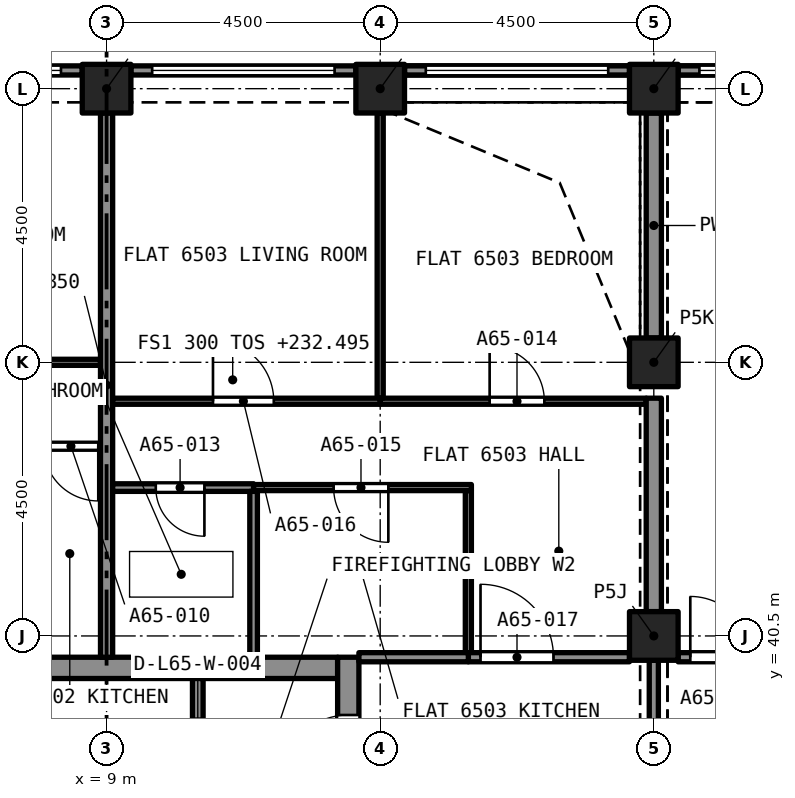
"""IFC4 building model, lengths in metres.
Left out: names, types, materials, properties, quantities, classifications, styles, units other than length and angle.
Written with IfcOpenShell. Run it as: python <this file> out.ifc"""

import sys

from ifc_helpers import new_model, si_unit, direction, frame, frame_2d, origin, origin_2d, place, context, subcontext, project, spatial, rectangle, extrude, element, fill, save


model = new_model("IFC4")
c1 = context("Model", 3, precision=1e-05, world=origin(), true_north=direction((0.0, 1.0)))
c2 = subcontext(c1, "Body", "Model", "MODEL_VIEW")
j1 = project(units=[si_unit("LENGTHUNIT", "METRE"), si_unit("PLANEANGLEUNIT", "RADIAN")], contexts=[c1])
p1 = place(None, origin())
s1 = spatial("IfcSite", under=j1, at=p1, CompositionType="ELEMENT")
p2 = place(p1, origin())
s2 = spatial("IfcBuilding", under=s1, at=p2, CompositionType="ELEMENT")
p3 = place(p2, frame((0.0, 0.0, 232.495)))
s3 = spatial("IfcBuildingStorey", under=s2, at=p3, CompositionType="ELEMENT", Elevation=232.495)
for number, where, z_axis, x_axis in (
    (1, (18.0, 40.5, 0.0), (0.0, 0.0, 1.0), (1.0, 0.0, 0.0)),
    (2, (18.0, 45.0, 0.0), (0.0, 0.0, 1.0), (1.0, 0.0, 0.0)),
    (3, (9.0, 49.5, 0.0), (0.0, 0.0, 1.0), (1.0, 0.0, 0.0)),
    (4, (13.5, 49.5, 0.0), (0.0, 0.0, 1.0), (1.0, 0.0, 0.0)),
    (5, (18.0, 49.5, 0.0), (0.0, 0.0, 1.0), (1.0, 0.0, 0.0)),
):
    element("IfcColumn", number, at=place(p3, frame(where, z_axis=z_axis, x_axis=x_axis)), inside=s3, PredefinedType="COLUMN", context=c2, shape_type="SweptSolid", body=[
        extrude(rectangle(XDim=0.8, YDim=0.8, at=origin_2d()), origin(), (0.0, 0.0, 1.0), 3.2),
    ])
p4 = place(p3, frame((5.2, 39.975, 0.0), z_axis=(0.0, 0.0, 1.0), x_axis=(1.0, 0.0, 0.0)))
e6 = element("IfcWall", 6, at=p4, inside=s3, PredefinedType="SOLIDWALL", context=c2, shape_type="SweptSolid", body=[
    extrude(rectangle(XDim=7.6, YDim=0.35, at=frame_2d((3.8, 0.0))), origin(), (0.0, 0.0, 1.0), 3.2),
])
p5 = place(p3, frame((12.975, 27.35, 0.0), z_axis=(0.0, 0.0, 1.0), x_axis=(0.0, 1.0, 0.0)))
e7 = element("IfcWall", 7, at=p5, inside=s3, PredefinedType="SOLIDWALL", context=c2, shape_type="SweptSolid", body=[
    extrude(rectangle(XDim=12.8, YDim=0.35, at=frame_2d((6.4, 0.0))), origin(), (0.0, 0.0, 1.0), 3.2),
])
p6 = place(p5, frame((10.75, 0.0, 0.0)))
e8 = element("IfcOpeningElement", 8, at=p6, cuts=e7, PredefinedType="OPENING", context=c2, shape_type="SweptSolid", body=[
    extrude(rectangle(XDim=1.1, YDim=2.1, at=frame_2d((0.55, 1.05))), frame((0.0, 0.185, 0.0), z_axis=(0.0, -1.0, 0.0), x_axis=(1.0, 0.0, 0.0)), (0.0, 0.0, 1.0), 0.37),
])
p7 = place(p5, frame((8.6, 0.0, 0.0)))
e9 = element("IfcOpeningElement", 9, at=p7, cuts=e7, PredefinedType="OPENING", context=c2, shape_type="SweptSolid", body=[
    extrude(rectangle(XDim=1.2, YDim=2.1, at=frame_2d((0.6, 1.05))), frame((0.0, 0.185, 0.0), z_axis=(0.0, -1.0, 0.0), x_axis=(1.0, 0.0, 0.0)), (0.0, 0.0, 1.0), 0.37),
])
p8 = place(p3, frame((18.4, 49.8, 0.0), z_axis=(0.0, 0.0, 1.0), x_axis=(1.0, 0.0, 0.0)))
e10 = element("IfcWall", 10, at=p8, inside=s3, PredefinedType="SOLIDWALL", context=c2, shape_type="SweptSolid", body=[
    extrude(rectangle(XDim=3.7, YDim=0.15, at=frame_2d((1.85, 0.0))), origin(), (0.0, 0.0, 1.0), 3.2),
])
p9 = place(p8, frame((0.35, 0.0, 0.45)))
e11 = element("IfcOpeningElement", 11, at=p9, cuts=e10, PredefinedType="OPENING", context=c2, shape_type="SweptSolid", body=[
    extrude(rectangle(XDim=3.0, YDim=1.95, at=frame_2d((1.5, 0.975))), frame((0.0, 0.085, 0.0), z_axis=(0.0, -1.0, 0.0), x_axis=(1.0, 0.0, 0.0)), (0.0, 0.0, 1.0), 0.17),
])
p10 = place(p3, frame((13.9, 49.8, 0.0), z_axis=(0.0, 0.0, 1.0), x_axis=(1.0, 0.0, 0.0)))
e12 = element("IfcWall", 12, at=p10, inside=s3, PredefinedType="SOLIDWALL", context=c2, shape_type="SweptSolid", body=[
    extrude(rectangle(XDim=3.7, YDim=0.15, at=frame_2d((1.85, 0.0))), origin(), (0.0, 0.0, 1.0), 3.2),
])
p11 = place(p10, frame((0.35, 0.0, 0.45)))
e13 = element("IfcOpeningElement", 13, at=p11, cuts=e12, PredefinedType="OPENING", context=c2, shape_type="SweptSolid", body=[
    extrude(rectangle(XDim=3.0, YDim=1.95, at=frame_2d((1.5, 0.975))), frame((0.0, 0.085, 0.0), z_axis=(0.0, -1.0, 0.0), x_axis=(1.0, 0.0, 0.0)), (0.0, 0.0, 1.0), 0.17),
])
p12 = place(p3, frame((9.4, 49.8, 0.0), z_axis=(0.0, 0.0, 1.0), x_axis=(1.0, 0.0, 0.0)))
e14 = element("IfcWall", 14, at=p12, inside=s3, PredefinedType="SOLIDWALL", context=c2, shape_type="SweptSolid", body=[
    extrude(rectangle(XDim=3.7, YDim=0.15, at=frame_2d((1.85, 0.0))), origin(), (0.0, 0.0, 1.0), 3.2),
])
p13 = place(p12, frame((0.35, 0.0, 0.45)))
e15 = element("IfcOpeningElement", 15, at=p13, cuts=e14, PredefinedType="OPENING", context=c2, shape_type="SweptSolid", body=[
    extrude(rectangle(XDim=3.0, YDim=1.95, at=frame_2d((1.5, 0.975))), frame((0.0, 0.085, 0.0), z_axis=(0.0, -1.0, 0.0), x_axis=(1.0, 0.0, 0.0)), (0.0, 0.0, 1.0), 0.17),
])
p14 = place(p3, frame((4.9, 49.8, 0.0), z_axis=(0.0, 0.0, 1.0), x_axis=(1.0, 0.0, 0.0)))
e16 = element("IfcWall", 16, at=p14, inside=s3, PredefinedType="SOLIDWALL", context=c2, shape_type="SweptSolid", body=[
    extrude(rectangle(XDim=3.7, YDim=0.15, at=frame_2d((1.85, 0.0))), origin(), (0.0, 0.0, 1.0), 3.2),
])
p15 = place(p14, frame((0.35, 0.0, 0.45)))
e17 = element("IfcOpeningElement", 17, at=p15, cuts=e16, PredefinedType="OPENING", context=c2, shape_type="SweptSolid", body=[
    extrude(rectangle(XDim=3.0, YDim=1.95, at=frame_2d((1.5, 0.975))), frame((0.0, 0.085, 0.0), z_axis=(0.0, -1.0, 0.0), x_axis=(1.0, 0.0, 0.0)), (0.0, 0.0, 1.0), 0.17),
])
for number, where, z_axis, x_axis in (
    (18, (18.4, 49.8, 3.2), (0.0, 0.0, 1.0), (1.0, 0.0, 0.0)),
    (19, (13.9, 49.8, 3.2), (0.0, 0.0, 1.0), (1.0, 0.0, 0.0)),
):
    element("IfcWall", number, at=place(p3, frame(where, z_axis=z_axis, x_axis=x_axis)), inside=s3, PredefinedType="PARAPET", context=c2, shape_type="SweptSolid", body=[
        extrude(rectangle(XDim=3.7, YDim=0.15, at=frame_2d((1.85, 0.0))), origin(), (0.0, 0.0, 1.0), 1.1),
    ])
p16 = place(p3, frame((4.5, 45.0, 0.0), z_axis=(0.0, 0.0, 1.0), x_axis=(1.0, 0.0, 0.0)))
e20 = element("IfcWall", 20, at=p16, inside=s3, PredefinedType="PARTITIONING", context=c2, shape_type="SweptSolid", body=[
    extrude(rectangle(XDim=4.4, YDim=0.1, at=frame_2d((2.2, 0.0))), origin(), (0.0, 0.0, 1.0), 2.85),
])
p17 = place(p16, frame((1.8, 0.0, 0.0)))
e21 = element("IfcOpeningElement", 21, at=p17, cuts=e20, PredefinedType="OPENING", context=c2, shape_type="SweptSolid", body=[
    extrude(rectangle(XDim=0.9, YDim=2.1, at=frame_2d((0.45, 1.05))), frame((0.0, 0.06, 0.0), z_axis=(0.0, -1.0, 0.0), x_axis=(1.0, 0.0, 0.0)), (0.0, 0.0, 1.0), 0.12),
])
p18 = place(p3, frame((8.9, 43.62, 0.0), z_axis=(0.0, 0.0, 1.0), x_axis=(-1.0, 0.0, 0.0)))
e22 = element("IfcWall", 22, at=p18, inside=s3, PredefinedType="PARTITIONING", context=c2, shape_type="SweptSolid", body=[
    extrude(rectangle(XDim=1.073, YDim=0.1, at=frame_2d((0.536, 0.0))), origin(), (0.0, 0.0, 1.0), 2.85),
])
p19 = place(p18, frame((0.036, 0.0, 0.0)))
e23 = element("IfcOpeningElement", 23, at=p19, cuts=e22, PredefinedType="OPENING", context=c2, shape_type="SweptSolid", body=[
    extrude(rectangle(XDim=0.9, YDim=2.1, at=frame_2d((0.45, 1.05))), frame((0.0, 0.06, 0.0), z_axis=(0.0, -1.0, 0.0), x_axis=(1.0, 0.0, 0.0)), (0.0, 0.0, 1.0), 0.12),
])
p20 = place(p3, frame((9.0, 40.15, 0.0), z_axis=(0.0, 0.0, 1.0), x_axis=(0.0, 1.0, 0.0)))
e24 = element("IfcWall", 24, at=p20, inside=s3, PredefinedType="PARTITIONING", context=c2, shape_type="SweptSolid", body=[
    extrude(rectangle(XDim=8.95, YDim=0.2, at=frame_2d((4.475, 0.0))), origin(), (0.0, 0.0, 1.0), 2.85),
])
p21 = place(p3, frame((11.418, 42.94, 0.0), z_axis=(0.0, 0.0, 1.0), x_axis=(-1.0, 0.0, 0.0)))
e25 = element("IfcWall", 25, at=p21, inside=s3, PredefinedType="PARTITIONING", context=c2, shape_type="SweptSolid", body=[
    extrude(rectangle(XDim=2.318, YDim=0.125, at=frame_2d((1.159, 0.0))), origin(), (0.0, 0.0, 1.0), 2.85),
])
p22 = place(p21, frame((0.809, 0.0, 0.0)))
e26 = element("IfcOpeningElement", 26, at=p22, cuts=e25, PredefinedType="OPENING", context=c2, shape_type="SweptSolid", body=[
    extrude(rectangle(XDim=0.8, YDim=2.1, at=frame_2d((0.4, 1.05))), frame((0.0, 0.073, 0.0), z_axis=(0.0, -1.0, 0.0), x_axis=(1.0, 0.0, 0.0)), (0.0, 0.0, 1.0), 0.145),
])
p23 = place(p3, frame((11.418, 40.15, 0.0), z_axis=(0.0, 0.0, 1.0), x_axis=(0.0, 1.0, 0.0)))
e27 = element("IfcWall", 27, at=p23, inside=s3, PredefinedType="PARTITIONING", context=c2, shape_type="SweptSolid", body=[
    extrude(rectangle(XDim=2.728, YDim=0.125, at=frame_2d((1.364, 0.0))), origin(), (0.0, 0.0, 1.0), 2.85),
])
p24 = place(p3, frame((13.5, 44.36, 0.0), z_axis=(0.0, 0.0, 1.0), x_axis=(1.0, 0.0, 0.0)))
e28 = element("IfcWall", 28, at=p24, inside=s3, PredefinedType="PARTITIONING", context=c2, shape_type="SweptSolid", body=[
    extrude(rectangle(XDim=4.375, YDim=0.1, at=frame_2d((2.188, 0.0))), origin(), (0.0, 0.0, 1.0), 2.85),
])
p25 = place(p24, frame((1.8, 0.0, 0.0)))
e29 = element("IfcOpeningElement", 29, at=p25, cuts=e28, PredefinedType="OPENING", context=c2, shape_type="SweptSolid", body=[
    extrude(rectangle(XDim=0.9, YDim=2.1, at=frame_2d((0.45, 1.05))), frame((0.0, 0.06, 0.0), z_axis=(0.0, -1.0, 0.0), x_axis=(1.0, 0.0, 0.0)), (0.0, 0.0, 1.0), 0.12),
])
p26 = place(p3, frame((13.5, 44.41, 0.0), z_axis=(0.0, 0.0, 1.0), x_axis=(0.0, 1.0, 0.0)))
e30 = element("IfcWall", 30, at=p26, inside=s3, PredefinedType="PARTITIONING", context=c2, shape_type="SweptSolid", body=[
    extrude(rectangle(XDim=4.69, YDim=0.1, at=frame_2d((2.345, 0.0))), origin(), (0.0, 0.0, 1.0), 2.85),
])
p27 = place(p3, frame((18.0, 45.4, 0.0), z_axis=(0.0, 0.0, 1.0), x_axis=(0.0, 1.0, 0.0)))
e31 = element("IfcWall", 31, at=p27, inside=s3, PredefinedType="PARTITIONING", context=c2, shape_type="SweptSolid", body=[
    extrude(rectangle(XDim=3.7, YDim=0.25, at=frame_2d((1.85, 0.0))), origin(), (0.0, 0.0, 1.0), 2.38),
])
p28 = place(p3, frame((14.95, 40.225, 0.0), z_axis=(0.0, 0.0, 1.0), x_axis=(0.0, 1.0, 0.0)))
e32 = element("IfcWall", 32, at=p28, inside=s3, PredefinedType="PARTITIONING", context=c2, shape_type="SweptSolid", body=[
    extrude(rectangle(XDim=2.665, YDim=0.1, at=frame_2d((1.333, 0.0))), origin(), (0.0, 0.0, 1.0), 2.85),
])
p29 = place(p3, frame((15.0, 42.94, 0.0), z_axis=(0.0, 0.0, 1.0), x_axis=(-1.0, 0.0, 0.0)))
e33 = element("IfcWall", 33, at=p29, inside=s3, PredefinedType="PARTITIONING", context=c2, shape_type="SweptSolid", body=[
    extrude(rectangle(XDim=3.582, YDim=0.1, at=frame_2d((1.791, 0.0))), origin(), (0.0, 0.0, 1.0), 2.85),
])
p30 = place(p29, frame((1.366, 0.0, 0.0)))
e34 = element("IfcOpeningElement", 34, at=p30, cuts=e33, PredefinedType="OPENING", context=c2, shape_type="SweptSolid", body=[
    extrude(rectangle(XDim=0.9, YDim=2.1, at=frame_2d((0.45, 1.05))), frame((0.0, 0.06, 0.0), z_axis=(0.0, -1.0, 0.0), x_axis=(1.0, 0.0, 0.0)), (0.0, 0.0, 1.0), 0.12),
])
p31 = place(p3, frame((9.1, 44.36, 0.0), z_axis=(0.0, 0.0, 1.0), x_axis=(1.0, 0.0, 0.0)))
e35 = element("IfcWall", 35, at=p31, inside=s3, PredefinedType="PARTITIONING", context=c2, shape_type="SweptSolid", body=[
    extrude(rectangle(XDim=4.4, YDim=0.1, at=frame_2d((2.2, 0.0))), origin(), (0.0, 0.0, 1.0), 2.85),
])
p32 = place(p31, frame((1.65, 0.0, 0.0)))
e36 = element("IfcOpeningElement", 36, at=p32, cuts=e35, PredefinedType="OPENING", context=c2, shape_type="SweptSolid", body=[
    extrude(rectangle(XDim=1.0, YDim=2.1, at=frame_2d((0.5, 1.05))), frame((0.0, 0.06, 0.0), z_axis=(0.0, -1.0, 0.0), x_axis=(1.0, 0.0, 0.0)), (0.0, 0.0, 1.0), 0.12),
])
p33 = place(p3, frame((18.0, 40.9, 0.0), z_axis=(0.0, 0.0, 1.0), x_axis=(0.0, 1.0, 0.0)))
e37 = element("IfcWall", 37, at=p33, inside=s3, PredefinedType="PARTITIONING", context=c2, shape_type="SweptSolid", body=[
    extrude(rectangle(XDim=3.51, YDim=0.25, at=frame_2d((1.755, 0.0))), origin(), (0.0, 0.0, 1.0), 2.38),
])
p34 = place(p3, frame((14.95, 40.15, 0.0), z_axis=(0.0, 0.0, 1.0), x_axis=(1.0, 0.0, 0.0)))
e38 = element("IfcWall", 38, at=p34, inside=s3, PredefinedType="PARTITIONING", context=c2, shape_type="SweptSolid", body=[
    extrude(rectangle(XDim=2.65, YDim=0.15, at=frame_2d((1.325, 0.0))), origin(), (0.0, 0.0, 1.0), 2.85),
])
p35 = place(p34, frame((0.2, 0.0, 0.0)))
e39 = element("IfcOpeningElement", 39, at=p35, cuts=e38, PredefinedType="OPENING", context=c2, shape_type="SweptSolid", body=[
    extrude(rectangle(XDim=1.2, YDim=2.4, at=frame_2d((0.6, 1.2))), frame((0.0, 0.085, 0.0), z_axis=(0.0, -1.0, 0.0), x_axis=(1.0, 0.0, 0.0)), (0.0, 0.0, 1.0), 0.17),
])
p36 = place(p3, frame((13.15, 40.15, 0.0), z_axis=(0.0, 0.0, 1.0), x_axis=(1.0, 0.0, 0.0)))
e40 = element("IfcWall", 40, at=p36, inside=s3, PredefinedType="PARTITIONING", context=c2, shape_type="SweptSolid", body=[
    extrude(rectangle(XDim=1.8, YDim=0.15, at=frame_2d((0.9, 0.0))), origin(), (0.0, 0.0, 1.0), 2.85),
])
p37 = place(p3, frame((18.4, 40.15, 0.0), z_axis=(0.0, 0.0, 1.0), x_axis=(1.0, 0.0, 0.0)))
e41 = element("IfcWall", 41, at=p37, inside=s3, PredefinedType="PARTITIONING", context=c2, shape_type="SweptSolid", body=[
    extrude(rectangle(XDim=2.2, YDim=0.15, at=frame_2d((1.1, 0.0))), origin(), (0.0, 0.0, 1.0), 2.75),
])
p38 = place(p37, frame((0.2, 0.0, 0.0)))
e42 = element("IfcOpeningElement", 42, at=p38, cuts=e41, PredefinedType="OPENING", context=c2, shape_type="SweptSolid", body=[
    extrude(rectangle(XDim=1.0, YDim=2.1, at=frame_2d((0.5, 1.05))), frame((0.0, 0.085, 0.0), z_axis=(0.0, -1.0, 0.0), x_axis=(1.0, 0.0, 0.0)), (0.0, 0.0, 1.0), 0.17),
])
p39 = place(p3, frame((18.0, 40.1, 0.0), z_axis=(0.0, 0.0, 1.0), x_axis=(0.0, -1.0, 0.0)))
e43 = element("IfcWall", 43, at=p39, inside=s3, PredefinedType="PARTITIONING", context=c2, shape_type="SweptSolid", body=[
    extrude(rectangle(XDim=3.7, YDim=0.15, at=frame_2d((1.85, 0.0))), origin(), (0.0, 0.0, 1.0), 2.38),
])
p40 = place(p39, frame((1.25, 0.0, 0.0)))
e44 = element("IfcOpeningElement", 44, at=p40, cuts=e43, PredefinedType="OPENING", context=c2, shape_type="SweptSolid", body=[
    extrude(rectangle(XDim=1.2, YDim=2.1, at=frame_2d((0.6, 1.05))), frame((0.0, 0.085, 0.0), z_axis=(0.0, -1.0, 0.0), x_axis=(1.0, 0.0, 0.0)), (0.0, 0.0, 1.0), 0.17),
])
p41 = place(p3, frame((10.5, 37.5, 0.0), z_axis=(0.0, 0.0, 1.0), x_axis=(0.0, 1.0, 0.0)))
e45 = element("IfcWall", 45, at=p41, inside=s3, PredefinedType="SOLIDWALL", context=c2, shape_type="SweptSolid", body=[
    extrude(rectangle(XDim=2.3, YDim=0.175, at=frame_2d((1.15, 0.0))), origin(), (0.0, 0.0, 1.0), 2.85),
])
p42 = place(p41, frame((0.65, 0.0, 0.0)))
e46 = element("IfcOpeningElement", 46, at=p42, cuts=e45, PredefinedType="OPENING", context=c2, shape_type="SweptSolid", body=[
    extrude(rectangle(XDim=1.0, YDim=2.1, at=frame_2d((0.5, 1.05))), frame((0.0, 0.097, 0.0), z_axis=(0.0, -1.0, 0.0), x_axis=(1.0, 0.0, 0.0)), (0.0, 0.0, 1.0), 0.195),
])
p43 = place(p9, origin())
e47 = element("IfcWindow", 47, at=p43, inside=s3, PartitioningType="SINGLE_PANEL", PredefinedType="WINDOW", context=c2, shape_type="SweptSolid", body=[
    extrude(rectangle(XDim=3.0, YDim=1.95, at=frame_2d((1.5, 0.975))), frame((0.0, 0.03, 0.0), z_axis=(0.0, -1.0, 0.0), x_axis=(1.0, 0.0, 0.0)), (0.0, 0.0, 1.0), 0.06),
])
fill(e11, e47)
p44 = place(p11, origin())
e48 = element("IfcWindow", 48, at=p44, inside=s3, PartitioningType="SINGLE_PANEL", PredefinedType="WINDOW", context=c2, shape_type="SweptSolid", body=[
    extrude(rectangle(XDim=3.0, YDim=1.95, at=frame_2d((1.5, 0.975))), frame((0.0, 0.03, 0.0), z_axis=(0.0, -1.0, 0.0), x_axis=(1.0, 0.0, 0.0)), (0.0, 0.0, 1.0), 0.06),
])
fill(e13, e48)
p45 = place(p13, origin())
e49 = element("IfcWindow", 49, at=p45, inside=s3, PartitioningType="SINGLE_PANEL", PredefinedType="WINDOW", context=c2, shape_type="SweptSolid", body=[
    extrude(rectangle(XDim=3.0, YDim=1.95, at=frame_2d((1.5, 0.975))), frame((0.0, 0.03, 0.0), z_axis=(0.0, -1.0, 0.0), x_axis=(1.0, 0.0, 0.0)), (0.0, 0.0, 1.0), 0.06),
])
fill(e15, e49)
p46 = place(p15, origin())
e50 = element("IfcWindow", 50, at=p46, inside=s3, PartitioningType="SINGLE_PANEL", PredefinedType="WINDOW", context=c2, shape_type="SweptSolid", body=[
    extrude(rectangle(XDim=3.0, YDim=1.95, at=frame_2d((1.5, 0.975))), frame((0.0, 0.03, 0.0), z_axis=(0.0, -1.0, 0.0), x_axis=(1.0, 0.0, 0.0)), (0.0, 0.0, 1.0), 0.06),
])
fill(e17, e50)
p47 = place(p19, origin())
e51 = element("IfcDoor", 51, at=p47, inside=s3, OperationType="SINGLE_SWING_LEFT", PredefinedType="DOOR", context=c2, shape_type="SweptSolid", body=[
    extrude(rectangle(XDim=0.9, YDim=2.1, at=frame_2d((0.45, 1.05))), frame((0.0, 0.025, 0.0), z_axis=(0.0, -1.0, 0.0), x_axis=(1.0, 0.0, 0.0)), (0.0, 0.0, 1.0), 0.05),
])
fill(e23, e51)
p48 = place(p22, origin())
e52 = element("IfcDoor", 52, at=p48, inside=s3, OperationType="SINGLE_SWING_RIGHT", PredefinedType="DOOR", context=c2, shape_type="SweptSolid", body=[
    extrude(rectangle(XDim=0.8, YDim=2.1, at=frame_2d((0.4, 1.05))), frame((0.0, 0.025, 0.0), z_axis=(0.0, -1.0, 0.0), x_axis=(1.0, 0.0, 0.0)), (0.0, 0.0, 1.0), 0.05),
])
fill(e26, e52)
p49 = place(p25, origin())
e53 = element("IfcDoor", 53, at=p49, inside=s3, OperationType="SINGLE_SWING_RIGHT", PredefinedType="DOOR", context=c2, shape_type="SweptSolid", body=[
    extrude(rectangle(XDim=0.9, YDim=2.1, at=frame_2d((0.45, 1.05))), frame((0.0, 0.025, 0.0), z_axis=(0.0, -1.0, 0.0), x_axis=(1.0, 0.0, 0.0)), (0.0, 0.0, 1.0), 0.05),
])
fill(e29, e53)
p50 = place(p30, origin())
e54 = element("IfcDoor", 54, at=p50, inside=s3, OperationType="SINGLE_SWING_RIGHT", PredefinedType="DOOR", context=c2, shape_type="SweptSolid", body=[
    extrude(rectangle(XDim=0.9, YDim=2.1, at=frame_2d((0.45, 1.05))), frame((0.0, 0.025, 0.0), z_axis=(0.0, -1.0, 0.0), x_axis=(1.0, 0.0, 0.0)), (0.0, 0.0, 1.0), 0.05),
])
fill(e34, e54)
p51 = place(p32, origin())
e55 = element("IfcDoor", 55, at=p51, inside=s3, OperationType="SINGLE_SWING_LEFT", PredefinedType="DOOR", context=c2, shape_type="SweptSolid", body=[
    extrude(rectangle(XDim=1.0, YDim=2.1, at=frame_2d((0.5, 1.05))), frame((0.0, 0.025, 0.0), z_axis=(0.0, -1.0, 0.0), x_axis=(1.0, 0.0, 0.0)), (0.0, 0.0, 1.0), 0.05),
])
fill(e36, e55)
p52 = place(p35, origin())
e56 = element("IfcDoor", 56, at=p52, inside=s3, OperationType="SINGLE_SWING_LEFT", PredefinedType="DOOR", context=c2, shape_type="SweptSolid", body=[
    extrude(rectangle(XDim=1.2, YDim=2.4, at=frame_2d((0.6, 1.2))), frame((0.0, 0.025, 0.0), z_axis=(0.0, -1.0, 0.0), x_axis=(1.0, 0.0, 0.0)), (0.0, 0.0, 1.0), 0.05),
])
fill(e39, e56)
p53 = place(p38, origin())
e57 = element("IfcDoor", 57, at=p53, inside=s3, OperationType="SINGLE_SWING_LEFT", PredefinedType="DOOR", context=c2, shape_type="SweptSolid", body=[
    extrude(rectangle(XDim=1.0, YDim=2.1, at=frame_2d((0.5, 1.05))), frame((0.0, 0.025, 0.0), z_axis=(0.0, -1.0, 0.0), x_axis=(1.0, 0.0, 0.0)), (0.0, 0.0, 1.0), 0.05),
])
fill(e42, e57)
p54 = place(p6, origin())
e58 = element("IfcDoor", 58, at=p54, inside=s3, OperationType="SINGLE_SWING_LEFT", PredefinedType="DOOR", context=c2, shape_type="SweptSolid", body=[
    extrude(rectangle(XDim=1.1, YDim=2.1, at=frame_2d((0.55, 1.05))), frame((0.0, 0.025, 0.0), z_axis=(0.0, -1.0, 0.0), x_axis=(1.0, 0.0, 0.0)), (0.0, 0.0, 1.0), 0.05),
])
fill(e8, e58)
save(model, sys.argv[1])
